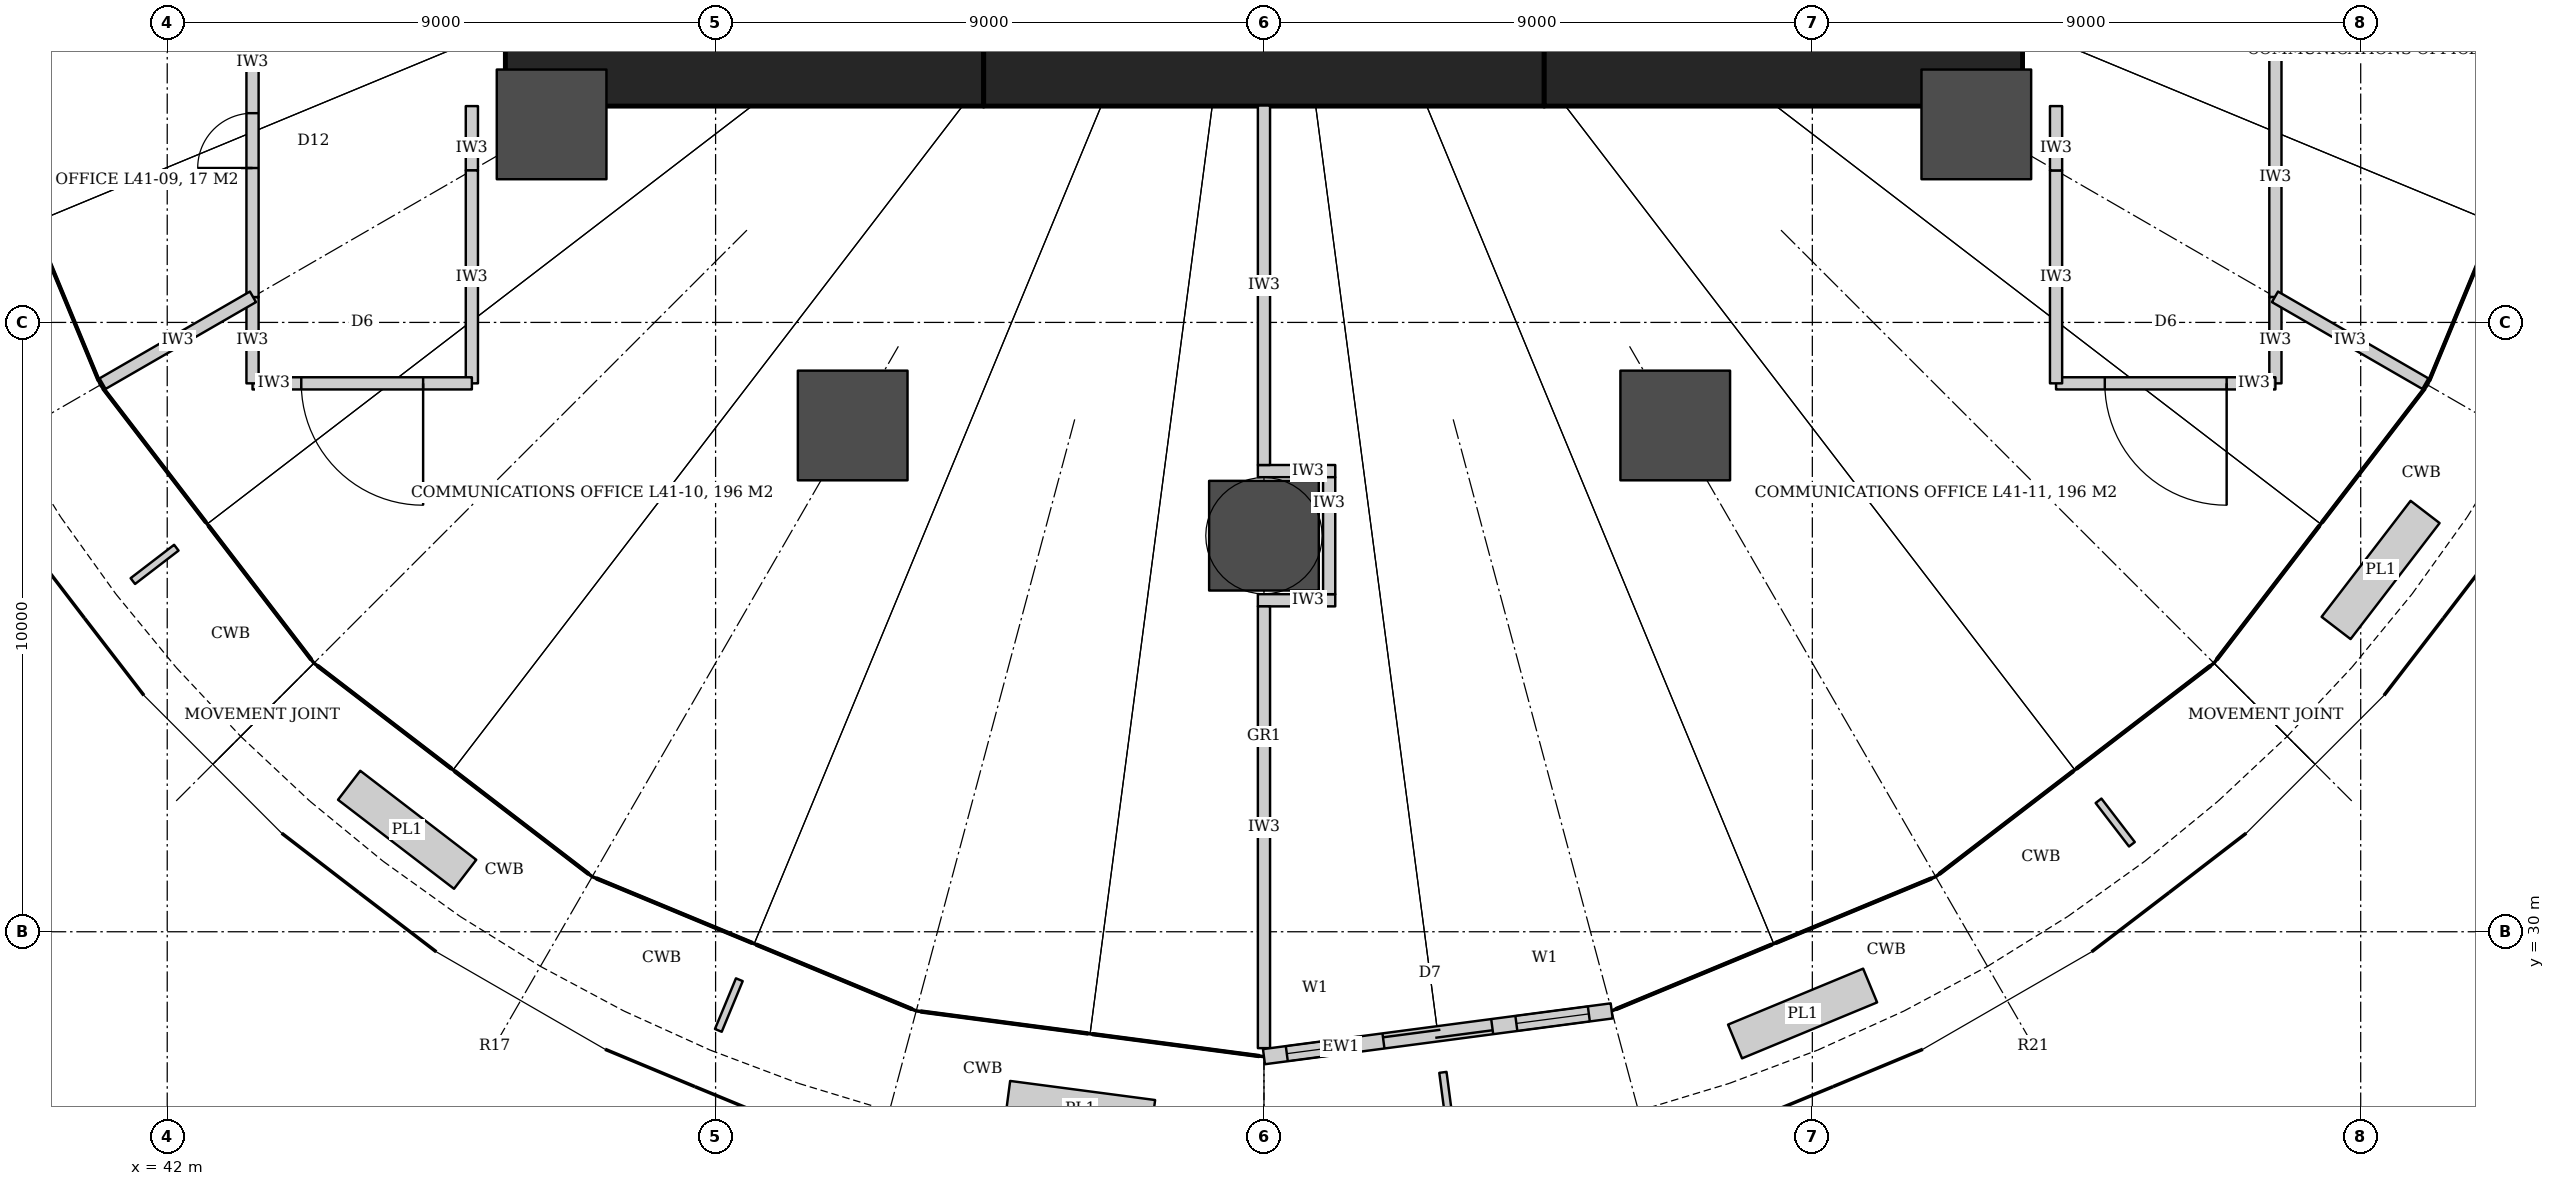
"""IFC4 building model, lengths in metres.
Left out: names, types, materials, properties, quantities, classifications, styles, units other than length and angle.
Written with IfcOpenShell. Run it as: python <this file> out.ifc"""

import sys

from ifc_helpers import new_model, si_unit, direction, frame, frame_2d, origin, origin_2d, place, context, subcontext, project, spatial, rectangle, hollow_circle, extrude, element, fill, save


model = new_model("IFC4")
c1 = context("Model", 3, precision=1e-05, world=origin(), true_north=direction((0.0, 1.0)))
c2 = subcontext(c1, "Body", "Model", "MODEL_VIEW")
j1 = project(units=[si_unit("LENGTHUNIT", "METRE"), si_unit("PLANEANGLEUNIT", "RADIAN")], contexts=[c1])
p1 = place(None, origin())
s1 = spatial("IfcSite", under=j1, at=p1, CompositionType="ELEMENT")
p2 = place(p1, origin())
s2 = spatial("IfcBuilding", under=s1, at=p2, CompositionType="ELEMENT")
p3 = place(p2, frame((0.0, 0.0, 173.0)))
s3 = spatial("IfcBuildingStorey", under=s2, at=p3, CompositionType="ELEMENT", Elevation=173.0)
p4 = place(p3, frame((47.55, 44.45, 0.0), z_axis=(0.0, 0.0, 1.0), x_axis=(1.0, 0.0, 0.0)))
e1 = element("IfcWall", 1, at=p4, inside=s3, PredefinedType="SHEAR", context=c2, shape_type="SweptSolid", body=[
    extrude(rectangle(XDim=7.85, YDim=1.8, at=frame_2d((3.925, 0.0))), origin(), (0.0, 0.0, 1.0), 4.2),
])
p5 = place(p3, frame((55.4, 44.45, 0.0), z_axis=(0.0, 0.0, 1.0), x_axis=(1.0, 0.0, 0.0)))
e2 = element("IfcWall", 2, at=p5, inside=s3, PredefinedType="SHEAR", context=c2, shape_type="SweptSolid", body=[
    extrude(rectangle(XDim=9.2, YDim=1.8, at=frame_2d((4.6, 0.0))), origin(), (0.0, 0.0, 1.0), 4.2),
])
p6 = place(p3, frame((64.6, 44.45, 0.0), z_axis=(0.0, 0.0, 1.0), x_axis=(1.0, 0.0, 0.0)))
e3 = element("IfcWall", 3, at=p6, inside=s3, PredefinedType="SHEAR", context=c2, shape_type="SweptSolid", body=[
    extrude(rectangle(XDim=7.85, YDim=1.8, at=frame_2d((3.925, 0.0))), origin(), (0.0, 0.0, 1.0), 4.2),
])
for number, where, z_axis, x_axis in (
    (4, (48.309, 43.25, 0.0), (0.0, 0.0, 1.0), (1.0, 0.0, 0.0)),
    (5, (53.25, 38.309, 0.0), (0.0, 0.0, 1.0), (1.0, 0.0, 0.0)),
    (6, (60.0, 36.5, 0.0), (0.0, 0.0, 1.0), (1.0, 0.0, 0.0)),
    (7, (66.75, 38.309, 0.0), (0.0, 0.0, 1.0), (1.0, 0.0, 0.0)),
    (8, (71.691, 43.25, 0.0), (0.0, 0.0, 1.0), (1.0, 0.0, 0.0)),
):
    element("IfcColumn", number, at=place(p3, frame(where, z_axis=z_axis, x_axis=x_axis)), inside=s3, PredefinedType="COLUMN", context=c2, shape_type="SweptSolid", body=[
        extrude(hollow_circle(Radius=0.508, WallThickness=0.05, at=origin_2d()), origin(), (0.0, 0.0, 1.0), 4.2),
    ])
p7 = place(p3, frame((76.6, 50.0, 0.0), z_axis=(0.0, 0.0, 1.0), x_axis=(0.0, -1.0, 0.0)))
e9 = element("IfcWall", 9, at=p7, inside=s3, PredefinedType="PARTITIONING", context=c2, shape_type="SweptSolid", body=[
    extrude(rectangle(XDim=9.584, YDim=0.2, at=frame_2d((4.792, 0.0))), origin(), (0.0, 0.0, 1.0), 3.012),
])
p8 = place(p7, frame((4.292, 0.0, 0.0)))
e10 = element("IfcOpeningElement", 10, at=p8, cuts=e9, PredefinedType="OPENING", context=c2, shape_type="SweptSolid", body=[
    extrude(rectangle(XDim=1.0, YDim=2.1, at=frame_2d((0.5, 1.05))), frame((0.0, 0.11, 0.0), z_axis=(0.0, -1.0, 0.0), x_axis=(1.0, 0.0, 0.0)), (0.0, 0.0, 1.0), 0.22),
])
p9 = place(p3, frame((76.6, 40.416, 0.0), z_axis=(0.0, 0.0, 1.0), x_axis=(0.0, -1.0, 0.0)))
e11 = element("IfcWall", 11, at=p9, inside=s3, PredefinedType="PARTITIONING", context=c2, shape_type="SweptSolid", body=[
    extrude(rectangle(XDim=1.416, YDim=0.2, at=frame_2d((0.708, 0.0))), origin(), (0.0, 0.0, 1.0), 3.012),
])
p10 = place(p3, frame((76.6, 39.0, 0.0), z_axis=(0.0, 0.0, 1.0), x_axis=(-1.0, 0.0, 0.0)))
e12 = element("IfcWall", 12, at=p10, inside=s3, PredefinedType="PARTITIONING", context=c2, shape_type="SweptSolid", body=[
    extrude(rectangle(XDim=3.6, YDim=0.2, at=frame_2d((1.8, 0.0))), origin(), (0.0, 0.0, 1.0), 3.04),
])
p11 = place(p10, frame((0.8, 0.0, 0.0)))
e13 = element("IfcOpeningElement", 13, at=p11, cuts=e12, PredefinedType="OPENING", context=c2, shape_type="SweptSolid", body=[
    extrude(rectangle(XDim=2.0, YDim=2.1, at=frame_2d((1.0, 1.05))), frame((0.0, 0.11, 0.0), z_axis=(0.0, -1.0, 0.0), x_axis=(1.0, 0.0, 0.0)), (0.0, 0.0, 1.0), 0.22),
])
p12 = place(p3, frame((73.0, 39.0, 0.0), z_axis=(0.0, 0.0, 1.0), x_axis=(0.0, 1.0, 0.0)))
e14 = element("IfcWall", 14, at=p12, inside=s3, PredefinedType="PARTITIONING", context=c2, shape_type="SweptSolid", body=[
    extrude(rectangle(XDim=3.494, YDim=0.2, at=frame_2d((1.747, 0.0))), origin(), (0.0, 0.0, 1.0), 3.012),
])
for number, where, z_axis, x_axis in (
    (15, (73.0, 42.494, 0.0), (0.0, 0.0, 1.0), (0.0, 1.0, 0.0)),
    (16, (47.0, 43.55, 0.0), (0.0, 0.0, 1.0), (0.0, -1.0, 0.0)),
):
    element("IfcWall", number, at=place(p3, frame(where, z_axis=z_axis, x_axis=x_axis)), inside=s3, PredefinedType="PARTITIONING", context=c2, shape_type="SweptSolid", body=[
        extrude(rectangle(XDim=1.056, YDim=0.2, at=frame_2d((0.528, 0.0))), origin(), (0.0, 0.0, 1.0), 3.012),
    ])
p13 = place(p3, frame((47.0, 42.494, 0.0), z_axis=(0.0, 0.0, 1.0), x_axis=(0.0, -1.0, 0.0)))
e17 = element("IfcWall", 17, at=p13, inside=s3, PredefinedType="PARTITIONING", context=c2, shape_type="SweptSolid", body=[
    extrude(rectangle(XDim=3.494, YDim=0.2, at=frame_2d((1.747, 0.0))), origin(), (0.0, 0.0, 1.0), 3.012),
])
p14 = place(p3, frame((47.0, 39.0, 0.0), z_axis=(0.0, 0.0, 1.0), x_axis=(-1.0, 0.0, 0.0)))
e18 = element("IfcWall", 18, at=p14, inside=s3, PredefinedType="PARTITIONING", context=c2, shape_type="SweptSolid", body=[
    extrude(rectangle(XDim=3.6, YDim=0.2, at=frame_2d((1.8, 0.0))), origin(), (0.0, 0.0, 1.0), 3.04),
])
p15 = place(p14, frame((0.8, 0.0, 0.0)))
e19 = element("IfcOpeningElement", 19, at=p15, cuts=e18, PredefinedType="OPENING", context=c2, shape_type="SweptSolid", body=[
    extrude(rectangle(XDim=2.0, YDim=2.1, at=frame_2d((1.0, 1.05))), frame((0.0, 0.11, 0.0), z_axis=(0.0, -1.0, 0.0), x_axis=(1.0, 0.0, 0.0)), (0.0, 0.0, 1.0), 0.22),
])
p16 = place(p3, frame((43.4, 39.0, 0.0), z_axis=(0.0, 0.0, 1.0), x_axis=(0.0, 1.0, 0.0)))
e20 = element("IfcWall", 20, at=p16, inside=s3, PredefinedType="PARTITIONING", context=c2, shape_type="SweptSolid", body=[
    extrude(rectangle(XDim=1.416, YDim=0.2, at=frame_2d((0.708, 0.0))), origin(), (0.0, 0.0, 1.0), 3.012),
])
p17 = place(p3, frame((43.4, 40.416, 0.0), z_axis=(0.0, 0.0, 1.0), x_axis=(0.0, 1.0, 0.0)))
e21 = element("IfcWall", 21, at=p17, inside=s3, PredefinedType="PARTITIONING", context=c2, shape_type="SweptSolid", body=[
    extrude(rectangle(XDim=5.136, YDim=0.2, at=frame_2d((2.568, 0.0))), origin(), (0.0, 0.0, 1.0), 3.012),
])
p18 = place(p17, frame((2.118, 0.0, 0.0)))
e22 = element("IfcOpeningElement", 22, at=p18, cuts=e21, PredefinedType="OPENING", context=c2, shape_type="SweptSolid", body=[
    extrude(rectangle(XDim=0.9, YDim=2.4, at=frame_2d((0.45, 1.2))), frame((0.0, 0.11, 0.0), z_axis=(0.0, -1.0, 0.0), x_axis=(1.0, 0.0, 0.0)), (0.0, 0.0, 1.0), 0.22),
])
p19 = place(p3, frame((43.406, 45.553, 0.0), z_axis=(0.0, 0.0, 1.0), x_axis=(-0.965932258808, -0.25879503742, 0.0)))
e23 = element("IfcWall", 23, at=p19, inside=s3, PredefinedType="PARTITIONING", context=c2, shape_type="SweptSolid", body=[
    extrude(rectangle(XDim=4.83, YDim=0.2, at=frame_2d((2.415, 0.0))), origin(), (0.0, 0.0, 1.0), 3.012),
])
p20 = place(p3, frame((43.407, 40.42, 0.0), z_axis=(0.0, 0.0, 1.0), x_axis=(-0.866039495442, -0.49997559174, 0.0)))
e24 = element("IfcWall", 24, at=p20, inside=s3, PredefinedType="PARTITIONING", context=c2, shape_type="SweptSolid", body=[
    extrude(rectangle(XDim=2.95, YDim=0.2, at=frame_2d((1.475, 0.0))), origin(), (0.0, 0.0, 1.0), 3.012),
])
for number, where, z_axis, x_axis in (
    (25, (59.9, 37.168, 0.0), (0.0, 0.0, 1.0), (1.0, 0.0, 0.0)),
    (26, (59.9, 35.832, 0.0), (0.0, 0.0, 1.0), (1.0, 0.0, 0.0)),
):
    element("IfcWall", number, at=place(p3, frame(where, z_axis=z_axis, x_axis=x_axis)), inside=s3, PredefinedType="PARTITIONING", context=c2, shape_type="SweptSolid", body=[
        extrude(rectangle(XDim=0.878, YDim=0.2, at=frame_2d((0.439, 0.0))), origin(), (0.0, 0.0, 1.0), 3.012),
    ])
p21 = place(p3, frame((60.678, 37.068, 0.0), z_axis=(0.0, 0.0, 1.0), x_axis=(0.0, -1.0, 0.0)))
e27 = element("IfcWall", 27, at=p21, inside=s3, PredefinedType="PARTITIONING", context=c2, shape_type="SweptSolid", body=[
    extrude(rectangle(XDim=1.136, YDim=0.2, at=frame_2d((0.568, 0.0))), origin(), (0.0, 0.0, 1.0), 3.012),
])
p22 = place(p3, frame((60.0, 43.56, 0.0), z_axis=(0.0, 0.0, 1.0), x_axis=(0.0, -1.0, 0.0)))
e28 = element("IfcWall", 28, at=p22, inside=s3, PredefinedType="PARTITIONING", context=c2, shape_type="SweptSolid", body=[
    extrude(rectangle(XDim=6.292, YDim=0.2, at=frame_2d((3.146, 0.0))), origin(), (0.0, 0.0, 1.0), 3.04),
])
p23 = place(p3, frame((60.0, 35.732, 0.0), z_axis=(0.0, 0.0, 1.0), x_axis=(0.0, -1.0, 0.0)))
e29 = element("IfcWall", 29, at=p23, inside=s3, PredefinedType="PARTITIONING", context=c2, shape_type="SweptSolid", body=[
    extrude(rectangle(XDim=7.742, YDim=0.2, at=frame_2d((3.871, 0.0))), origin(), (0.0, 0.0, 1.0), 3.012),
])
p24 = place(p3, frame((76.593, 40.42, 0.0), z_axis=(0.0, 0.0, 1.0), x_axis=(0.866039495442, -0.49997559174, 0.0)))
e30 = element("IfcWall", 30, at=p24, inside=s3, PredefinedType="PARTITIONING", context=c2, shape_type="SweptSolid", body=[
    extrude(rectangle(XDim=2.95, YDim=0.2, at=frame_2d((1.475, 0.0))), origin(), (0.0, 0.0, 1.0), 3.012),
])
p25 = place(p3, frame((41.45, 50.0, 0.0), z_axis=(0.0, 0.0, 1.0), x_axis=(-0.444556644785, -0.895750740763, 0.0)))
e31 = element("IfcWall", 31, at=p25, inside=s3, PredefinedType="SOLIDWALL", context=c2, shape_type="SweptSolid", body=[
    extrude(rectangle(XDim=6.4, YDim=0.25, at=frame_2d((3.2, 0.0))), origin(), (0.0, 0.0, 1.0), 4.04),
])
p26 = place(p25, frame((2.3, 0.0, 0.0)))
e32 = element("IfcOpeningElement", 32, at=p26, cuts=e31, PredefinedType="OPENING", context=c2, shape_type="SweptSolid", body=[
    extrude(rectangle(XDim=1.8, YDim=2.4, at=frame_2d((0.9, 1.2))), frame((0.0, 0.135, 0.0), z_axis=(0.0, -1.0, 0.0), x_axis=(1.0, 0.0, 0.0)), (0.0, 0.0, 1.0), 0.27),
])
p27 = place(p25, frame((0.7, 0.0, 0.0)))
e33 = element("IfcOpeningElement", 33, at=p27, cuts=e31, PredefinedType="OPENING", context=c2, shape_type="SweptSolid", body=[
    extrude(rectangle(XDim=1.2, YDim=2.4, at=frame_2d((0.6, 1.2))), frame((0.0, 0.135, 0.0), z_axis=(0.0, -1.0, 0.0), x_axis=(1.0, 0.0, 0.0)), (0.0, 0.0, 1.0), 0.27),
])
p28 = place(p25, frame((4.5, 0.0, 0.0)))
e34 = element("IfcOpeningElement", 34, at=p28, cuts=e31, PredefinedType="OPENING", context=c2, shape_type="SweptSolid", body=[
    extrude(rectangle(XDim=1.2, YDim=2.4, at=frame_2d((0.6, 1.2))), frame((0.0, 0.135, 0.0), z_axis=(0.0, -1.0, 0.0), x_axis=(1.0, 0.0, 0.0)), (0.0, 0.0, 1.0), 0.27),
])
p29 = place(p3, frame((60.0, 27.85, 0.0), z_axis=(0.0, 0.0, 1.0), x_axis=(0.991447396143, 0.130506937291, 0.0)))
e35 = element("IfcWall", 35, at=p29, inside=s3, PredefinedType="SOLIDWALL", context=c2, shape_type="SweptSolid", body=[
    extrude(rectangle(XDim=5.782, YDim=0.25, at=frame_2d((2.891, 0.0))), origin(), (0.0, 0.0, 1.0), 4.04),
])
p30 = place(p29, frame((1.991, 0.0, 0.0)))
e36 = element("IfcOpeningElement", 36, at=p30, cuts=e35, PredefinedType="OPENING", context=c2, shape_type="SweptSolid", body=[
    extrude(rectangle(XDim=1.8, YDim=2.4, at=frame_2d((0.9, 1.2))), frame((0.0, 0.135, 0.0), z_axis=(0.0, -1.0, 0.0), x_axis=(1.0, 0.0, 0.0)), (0.0, 0.0, 1.0), 0.27),
])
p31 = place(p29, frame((0.391, 0.0, 0.0)))
e37 = element("IfcOpeningElement", 37, at=p31, cuts=e35, PredefinedType="OPENING", context=c2, shape_type="SweptSolid", body=[
    extrude(rectangle(XDim=1.2, YDim=2.4, at=frame_2d((0.6, 1.2))), frame((0.0, 0.135, 0.0), z_axis=(0.0, -1.0, 0.0), x_axis=(1.0, 0.0, 0.0)), (0.0, 0.0, 1.0), 0.27),
])
p32 = place(p29, frame((4.191, 0.0, 0.0)))
e38 = element("IfcOpeningElement", 38, at=p32, cuts=e35, PredefinedType="OPENING", context=c2, shape_type="SweptSolid", body=[
    extrude(rectangle(XDim=1.2, YDim=2.4, at=frame_2d((0.6, 1.2))), frame((0.0, 0.135, 0.0), z_axis=(0.0, -1.0, 0.0), x_axis=(1.0, 0.0, 0.0)), (0.0, 0.0, 1.0), 0.27),
])
p33 = place(p18, origin())
e39 = element("IfcDoor", 39, at=p33, inside=s3, OperationType="SINGLE_SWING_LEFT", PredefinedType="DOOR", context=c2, shape_type="SweptSolid", body=[
    extrude(rectangle(XDim=0.9, YDim=2.4, at=frame_2d((0.45, 1.2))), frame((0.0, 0.025, 0.0), z_axis=(0.0, -1.0, 0.0), x_axis=(1.0, 0.0, 0.0)), (0.0, 0.0, 1.0), 0.05),
])
fill(e22, e39)
p34 = place(p15, origin())
e40 = element("IfcDoor", 40, at=p34, inside=s3, OperationType="DOUBLE_DOOR_DOUBLE_SWING", PredefinedType="DOOR", context=c2, shape_type="SweptSolid", body=[
    extrude(rectangle(XDim=2.0, YDim=2.1, at=frame_2d((1.0, 1.05))), frame((0.0, 0.025, 0.0), z_axis=(0.0, -1.0, 0.0), x_axis=(1.0, 0.0, 0.0)), (0.0, 0.0, 1.0), 0.05),
])
fill(e19, e40)
p35 = place(p11, origin())
e41 = element("IfcDoor", 41, at=p35, inside=s3, OperationType="DOUBLE_DOOR_DOUBLE_SWING", PredefinedType="DOOR", context=c2, shape_type="SweptSolid", body=[
    extrude(rectangle(XDim=2.0, YDim=2.1, at=frame_2d((1.0, 1.05))), frame((0.0, 0.025, 0.0), z_axis=(0.0, -1.0, 0.0), x_axis=(1.0, 0.0, 0.0)), (0.0, 0.0, 1.0), 0.05),
])
fill(e13, e41)
p36 = place(p30, origin())
e42 = element("IfcDoor", 42, at=p36, inside=s3, OperationType="DOUBLE_DOOR_SLIDING", PredefinedType="DOOR", context=c2, shape_type="SweptSolid", body=[
    extrude(rectangle(XDim=1.8, YDim=2.4, at=frame_2d((0.9, 1.2))), frame((0.0, 0.025, 0.0), z_axis=(0.0, -1.0, 0.0), x_axis=(1.0, 0.0, 0.0)), (0.0, 0.0, 1.0), 0.05),
])
fill(e36, e42)
p37 = place(p31, origin())
e43 = element("IfcWindow", 43, at=p37, inside=s3, PartitioningType="SINGLE_PANEL", PredefinedType="WINDOW", context=c2, shape_type="SweptSolid", body=[
    extrude(rectangle(XDim=1.2, YDim=2.4, at=frame_2d((0.6, 1.2))), frame((0.0, 0.03, 0.0), z_axis=(0.0, -1.0, 0.0), x_axis=(1.0, 0.0, 0.0)), (0.0, 0.0, 1.0), 0.06),
])
fill(e37, e43)
p38 = place(p32, origin())
e44 = element("IfcWindow", 44, at=p38, inside=s3, PartitioningType="SINGLE_PANEL", PredefinedType="WINDOW", context=c2, shape_type="SweptSolid", body=[
    extrude(rectangle(XDim=1.2, YDim=2.4, at=frame_2d((0.6, 1.2))), frame((0.0, 0.03, 0.0), z_axis=(0.0, -1.0, 0.0), x_axis=(1.0, 0.0, 0.0)), (0.0, 0.0, 1.0), 0.06),
])
fill(e38, e44)
save(model, sys.argv[1])
